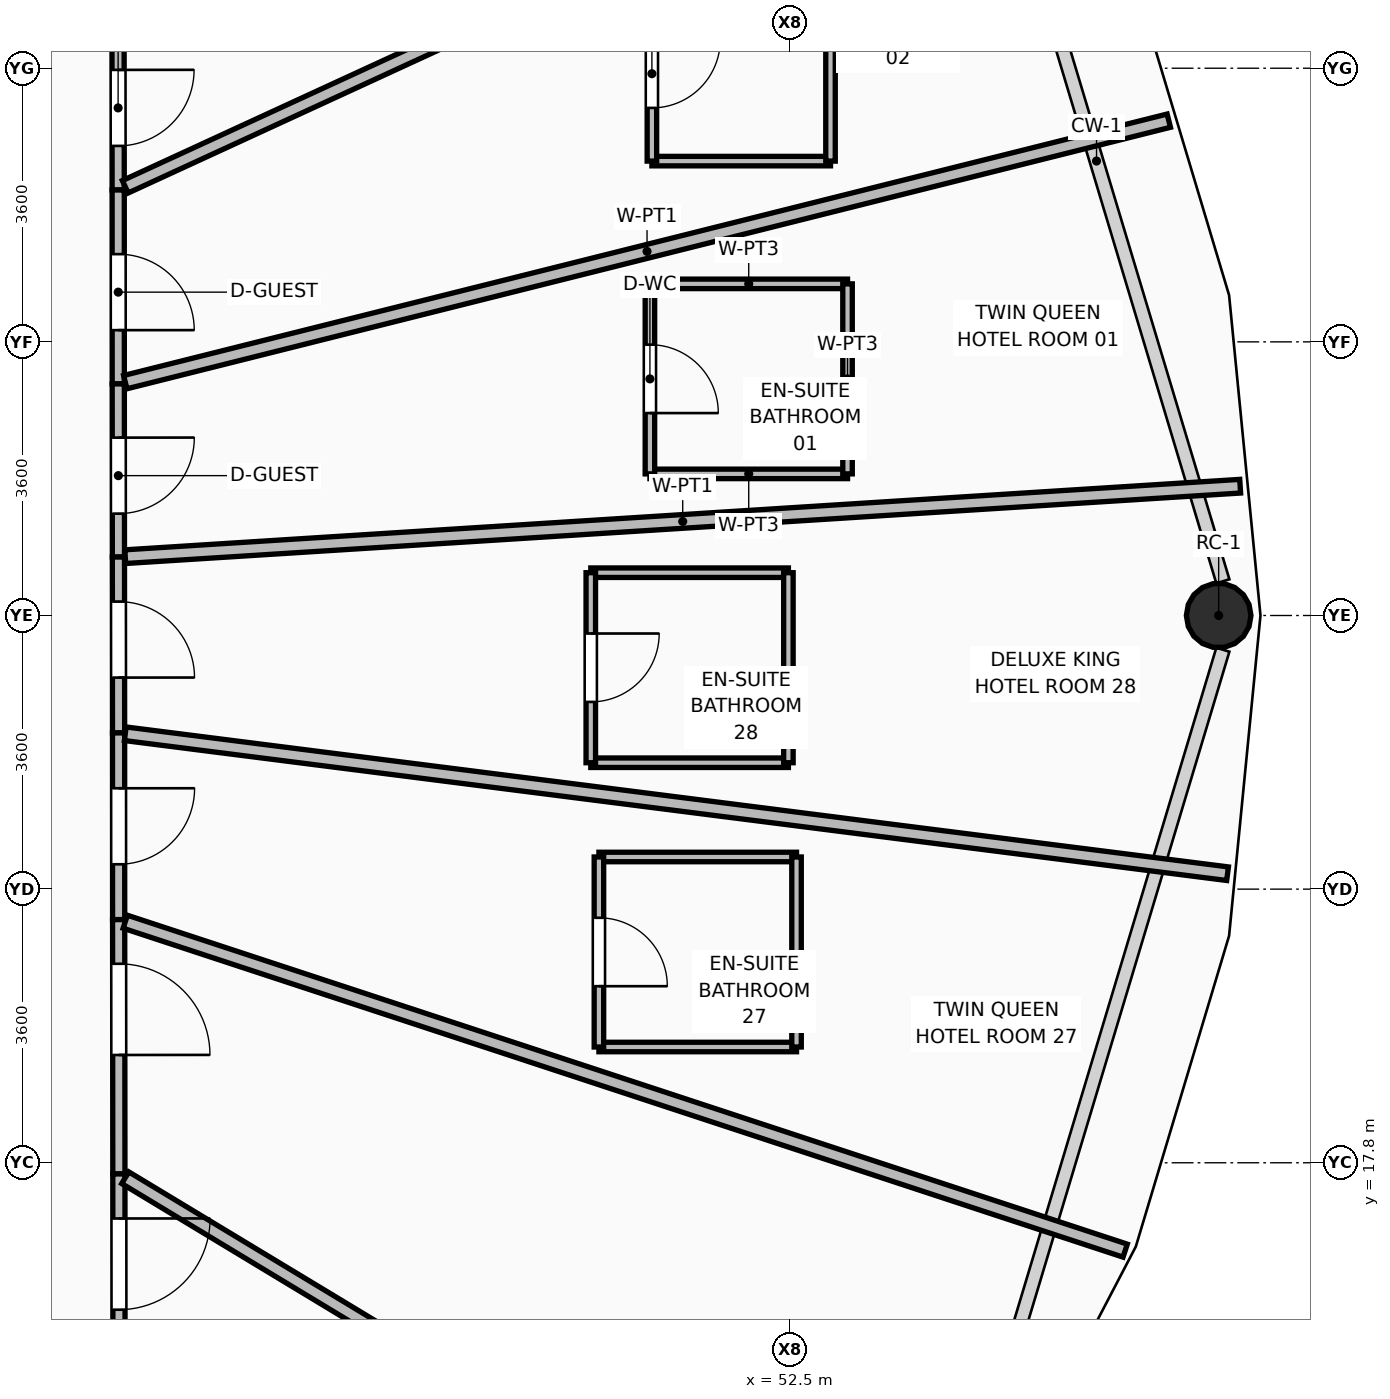
"""IFC4 building model, lengths in metres.
Left out: names, types, materials, properties, quantities, classifications, styles, units other than length and angle.
Written with IfcOpenShell. Run it as: python <this file> out.ifc"""

import sys

from ifc_helpers import new_model, si_unit, direction, frame, frame_2d, origin, origin_2d, place, context, subcontext, project, spatial, rectangle, hollow_circle, extrude, element, fill, save


model = new_model("IFC4")
c1 = context("Model", 3, precision=1e-05, world=origin(), true_north=direction((0.0, 1.0)))
c2 = subcontext(c1, "Body", "Model", "MODEL_VIEW")
j1 = project(units=[si_unit("LENGTHUNIT", "METRE"), si_unit("PLANEANGLEUNIT", "RADIAN")], contexts=[c1])
p1 = place(None, origin())
s1 = spatial("IfcSite", under=j1, at=p1, CompositionType="ELEMENT")
p2 = place(p1, origin())
s2 = spatial("IfcBuilding", under=s1, at=p2, CompositionType="ELEMENT")
p3 = place(p2, frame((0.0, 0.0, 53.25)))
s3 = spatial("IfcBuildingStorey", under=s2, at=p3, CompositionType="ELEMENT", Elevation=53.25)
p4 = place(p3, frame((58.139, 25.0, 0.0), z_axis=(0.221785382613, 0.0, 0.975095505096), x_axis=(0.0, 1.0, 0.0)))
e1 = element("IfcColumn", 1, at=p4, inside=s3, PredefinedType="COLUMN", context=c2, shape_type="SweptSolid", body=[
    extrude(hollow_circle(Radius=0.425, WallThickness=0.04, at=origin_2d()), origin(), (0.0, 0.0, 1.0), 3.661),
])
p5 = place(p3, frame((43.657, 33.737, 0.0), z_axis=(0.0, 0.0, 1.0), x_axis=(0.000933270709, -0.999999564503, 0.0)))
e2 = element("IfcWall", 2, at=p5, inside=s3, PredefinedType="PARTITIONING", context=c2, shape_type="SweptSolid", body=[
    extrude(rectangle(XDim=3.139, YDim=0.16, at=frame_2d((1.57, 0.0))), origin(), (0.0, 0.0, 1.0), 2.928),
])
p6 = place(p5, frame((1.559, 0.0, 0.0)))
e3 = element("IfcOpeningElement", 3, at=p6, cuts=e2, PredefinedType="OPENING", context=c2, shape_type="SweptSolid", body=[
    extrude(rectangle(XDim=1.0, YDim=2.1, at=frame_2d((0.5, 1.05))), frame((0.0, 0.09, 0.0), z_axis=(0.0, -1.0, 0.0), x_axis=(1.0, 0.0, 0.0)), (0.0, 0.0, 1.0), 0.18),
])
p7 = place(p3, frame((43.66, 30.598, 0.0), z_axis=(0.0, 0.0, 1.0), x_axis=(0.000382848364, -0.999999926714, 0.0)))
e4 = element("IfcWall", 4, at=p7, inside=s3, PredefinedType="PARTITIONING", context=c2, shape_type="SweptSolid", body=[
    extrude(rectangle(XDim=2.551, YDim=0.16, at=frame_2d((1.275, 0.0))), origin(), (0.0, 0.0, 1.0), 3.55),
])
p8 = place(p7, frame((0.844, 0.0, 0.0)))
e5 = element("IfcOpeningElement", 5, at=p8, cuts=e4, PredefinedType="OPENING", context=c2, shape_type="SweptSolid", body=[
    extrude(rectangle(XDim=1.0, YDim=2.1, at=frame_2d((0.5, 1.05))), frame((0.0, 0.09, 0.0), z_axis=(0.0, -1.0, 0.0), x_axis=(1.0, 0.0, 0.0)), (0.0, 0.0, 1.0), 0.18),
])
p9 = place(p3, frame((43.661, 28.047, 0.0), z_axis=(0.0, 0.0, 1.0), x_axis=(0.000964526397, -0.999999534844, 0.0)))
e6 = element("IfcWall", 6, at=p9, inside=s3, PredefinedType="PARTITIONING", context=c2, shape_type="SweptSolid", body=[
    extrude(rectangle(XDim=2.278, YDim=0.16, at=frame_2d((1.139, 0.0))), origin(), (0.0, 0.0, 1.0), 3.55),
])
p10 = place(p9, frame((0.707, 0.0, 0.0)))
e7 = element("IfcOpeningElement", 7, at=p10, cuts=e6, PredefinedType="OPENING", context=c2, shape_type="SweptSolid", body=[
    extrude(rectangle(XDim=1.0, YDim=2.1, at=frame_2d((0.5, 1.05))), frame((0.0, 0.09, 0.0), z_axis=(0.0, -1.0, 0.0), x_axis=(1.0, 0.0, 0.0)), (0.0, 0.0, 1.0), 0.18),
])
p11 = place(p3, frame((43.663, 25.769, 0.0), z_axis=(0.0, 0.0, 1.0), x_axis=(0.000844059628, -0.999999643782, 0.0)))
e8 = element("IfcWall", 8, at=p11, inside=s3, PredefinedType="PARTITIONING", context=c2, shape_type="SweptSolid", body=[
    extrude(rectangle(XDim=2.314, YDim=0.16, at=frame_2d((1.157, 0.0))), origin(), (0.0, 0.0, 1.0), 3.55),
])
p12 = place(p11, frame((0.586, 0.0, 0.0)))
e9 = element("IfcOpeningElement", 9, at=p12, cuts=e8, PredefinedType="OPENING", context=c2, shape_type="SweptSolid", body=[
    extrude(rectangle(XDim=1.0, YDim=2.1, at=frame_2d((0.5, 1.05))), frame((0.0, 0.09, 0.0), z_axis=(0.0, -1.0, 0.0), x_axis=(1.0, 0.0, 0.0)), (0.0, 0.0, 1.0), 0.18),
])
p13 = place(p3, frame((43.665, 23.455, 0.0), z_axis=(0.0, 0.0, 1.0), x_axis=(0.000397614283, -0.999999920951, 0.0)))
e10 = element("IfcWall", 10, at=p13, inside=s3, PredefinedType="PARTITIONING", context=c2, shape_type="SweptSolid", body=[
    extrude(rectangle(XDim=2.456, YDim=0.16, at=frame_2d((1.228, 0.0))), origin(), (0.0, 0.0, 1.0), 2.928),
])
p14 = place(p13, frame((0.728, 0.0, 0.0)))
e11 = element("IfcOpeningElement", 11, at=p14, cuts=e10, PredefinedType="OPENING", context=c2, shape_type="SweptSolid", body=[
    extrude(rectangle(XDim=1.0, YDim=2.1, at=frame_2d((0.5, 1.05))), frame((0.0, 0.09, 0.0), z_axis=(0.0, -1.0, 0.0), x_axis=(1.0, 0.0, 0.0)), (0.0, 0.0, 1.0), 0.18),
])
p15 = place(p3, frame((43.666, 20.999, 0.0), z_axis=(0.0, 0.0, 1.0), x_axis=(0.000875592514, -0.999999616669, 0.0)))
e12 = element("IfcWall", 12, at=p15, inside=s3, PredefinedType="PARTITIONING", context=c2, shape_type="SweptSolid", body=[
    extrude(rectangle(XDim=3.346, YDim=0.16, at=frame_2d((1.673, 0.0))), origin(), (0.0, 0.0, 1.0), 2.928),
])
p16 = place(p15, frame((0.581, 0.0, 0.0)))
e13 = element("IfcOpeningElement", 13, at=p16, cuts=e12, PredefinedType="OPENING", context=c2, shape_type="SweptSolid", body=[
    extrude(rectangle(XDim=1.2, YDim=2.1, at=frame_2d((0.6, 1.05))), frame((0.0, 0.09, 0.0), z_axis=(0.0, -1.0, 0.0), x_axis=(1.0, 0.0, 0.0)), (0.0, 0.0, 1.0), 0.18),
])
p17 = place(p3, frame((43.669, 17.653, 0.0), z_axis=(0.0, 0.0, 1.0), x_axis=(0.000535081189, -0.999999856844, 0.0)))
e14 = element("IfcWall", 14, at=p17, inside=s3, PredefinedType="PARTITIONING", context=c2, shape_type="SweptSolid", body=[
    extrude(rectangle(XDim=3.65, YDim=0.16, at=frame_2d((1.825, 0.0))), origin(), (0.0, 0.0, 1.0), 2.928),
])
p18 = place(p17, frame((0.586, 0.0, 0.0)))
e15 = element("IfcOpeningElement", 15, at=p18, cuts=e14, PredefinedType="OPENING", context=c2, shape_type="SweptSolid", body=[
    extrude(rectangle(XDim=1.2, YDim=2.1, at=frame_2d((0.6, 1.05))), frame((0.0, 0.09, 0.0), z_axis=(0.0, -1.0, 0.0), x_axis=(1.0, 0.0, 0.0)), (0.0, 0.0, 1.0), 0.18),
])
p19 = place(p3, frame((43.753, 25.774, 0.0), z_axis=(0.0, 0.0, 1.0), x_axis=(0.998009231822, 0.063068004547, 0.0)))
e16 = element("IfcWall", 16, at=p19, inside=s3, PredefinedType="PARTITIONING", context=c2, shape_type="SweptSolid", body=[
    extrude(rectangle(XDim=14.698, YDim=0.18, at=frame_2d((7.349, 0.0))), origin(), (0.0, 0.0, 1.0), 2.775),
])
p20 = place(p3, frame((43.753, 28.07, 0.0), z_axis=(0.0, 0.0, 1.0), x_axis=(0.970018590768, 0.243030725558, 0.0)))
e17 = element("IfcWall", 17, at=p20, inside=s3, PredefinedType="PARTITIONING", context=c2, shape_type="SweptSolid", body=[
    extrude(rectangle(XDim=14.154, YDim=0.18, at=frame_2d((7.077, 0.0))), origin(), (0.0, 0.0, 1.0), 2.775),
])
p21 = place(p3, frame((43.753, 30.64, 0.0), z_axis=(0.0, 0.0, 1.0), x_axis=(0.908354532473, 0.418200960466, 0.0)))
e18 = element("IfcWall", 18, at=p21, inside=s3, PredefinedType="PARTITIONING", context=c2, shape_type="SweptSolid", body=[
    extrude(rectangle(XDim=12.934, YDim=0.18, at=frame_2d((6.467, 0.0))), origin(), (0.0, 0.0, 1.0), 2.775),
])
p22 = place(p3, frame((43.753, 17.603, 0.0), z_axis=(0.0, 0.0, 1.0), x_axis=(0.856050971563, -0.516891414212, 0.0)))
e19 = element("IfcWall", 19, at=p22, inside=s3, PredefinedType="PARTITIONING", context=c2, shape_type="SweptSolid", body=[
    extrude(rectangle(XDim=11.8, YDim=0.18, at=frame_2d((5.9, 0.0))), origin(), (0.0, 0.0, 1.0), 2.775),
])
p23 = place(p3, frame((43.753, 20.971, 0.0), z_axis=(0.0, 0.0, 1.0), x_axis=(0.949941417746, -0.312428076284, 0.0)))
e20 = element("IfcWall", 20, at=p23, inside=s3, PredefinedType="PARTITIONING", context=c2, shape_type="SweptSolid", body=[
    extrude(rectangle(XDim=13.849, YDim=0.18, at=frame_2d((6.925, 0.0))), origin(), (0.0, 0.0, 1.0), 2.775),
])
p24 = place(p3, frame((43.753, 23.444, 0.0), z_axis=(0.0, 0.0, 1.0), x_axis=(0.992038929139, -0.125931580921, 0.0)))
e21 = element("IfcWall", 21, at=p24, inside=s3, PredefinedType="PARTITIONING", context=c2, shape_type="SweptSolid", body=[
    extrude(rectangle(XDim=14.62, YDim=0.18, at=frame_2d((7.31, 0.0))), origin(), (0.0, 0.0, 1.0), 2.775),
])
for number, where, z_axis, x_axis in (
    (22, (50.656, 26.863, 0.0), (0.0, 0.0, 1.0), (1.0, 0.0, 0.0)),
    (23, (50.656, 29.363, 0.0), (0.0, 0.0, 1.0), (1.0, 0.0, 0.0)),
):
    element("IfcWall", number, at=place(p3, frame(where, z_axis=z_axis, x_axis=x_axis)), inside=s3, PredefinedType="PARTITIONING", context=c2, shape_type="SweptSolid", body=[
        extrude(rectangle(XDim=2.6, YDim=0.125, at=frame_2d((1.3, 0.0))), origin(), (0.0, 0.0, 1.0), 3.55),
    ])
p25 = place(p3, frame((50.656, 26.863, 0.0), z_axis=(0.0, 0.0, 1.0), x_axis=(0.0, 1.0, 0.0)))
e24 = element("IfcWall", 24, at=p25, inside=s3, PredefinedType="PARTITIONING", context=c2, shape_type="SweptSolid", body=[
    extrude(rectangle(XDim=2.5, YDim=0.125, at=frame_2d((1.25, 0.0))), origin(), (0.0, 0.0, 1.0), 3.55),
])
p26 = place(p25, frame((0.8, 0.0, 0.0)))
e25 = element("IfcOpeningElement", 25, at=p26, cuts=e24, PredefinedType="OPENING", context=c2, shape_type="SweptSolid", body=[
    extrude(rectangle(XDim=0.9, YDim=2.1, at=frame_2d((0.45, 1.05))), frame((0.0, 0.073, 0.0), z_axis=(0.0, -1.0, 0.0), x_axis=(1.0, 0.0, 0.0)), (0.0, 0.0, 1.0), 0.145),
])
p27 = place(p3, frame((53.256, 26.863, 0.0), z_axis=(0.0, 0.0, 1.0), x_axis=(0.0, 1.0, 0.0)))
e26 = element("IfcWall", 26, at=p27, inside=s3, PredefinedType="PARTITIONING", context=c2, shape_type="SweptSolid", body=[
    extrude(rectangle(XDim=2.5, YDim=0.125, at=frame_2d((1.25, 0.0))), origin(), (0.0, 0.0, 1.0), 3.55),
])
p28 = place(p3, frame((50.682, 30.978, 0.0), z_axis=(0.0, 0.0, 1.0), x_axis=(1.0, 0.0, 0.0)))
e27 = element("IfcWall", 27, at=p28, inside=s3, PredefinedType="PARTITIONING", context=c2, shape_type="SweptSolid", body=[
    extrude(rectangle(XDim=2.35, YDim=0.125, at=frame_2d((1.175, 0.0))), origin(), (0.0, 0.0, 1.0), 3.55),
])
p29 = place(p3, frame((50.682, 30.978, 0.0), z_axis=(0.0, 0.0, 1.0), x_axis=(0.0, 1.0, 0.0)))
e28 = element("IfcWall", 28, at=p29, inside=s3, PredefinedType="PARTITIONING", context=c2, shape_type="SweptSolid", body=[
    extrude(rectangle(XDim=2.3, YDim=0.125, at=frame_2d((1.15, 0.0))), origin(), (0.0, 0.0, 1.0), 3.55),
])
p30 = place(p29, frame((0.7, 0.0, 0.0)))
e29 = element("IfcOpeningElement", 29, at=p30, cuts=e28, PredefinedType="OPENING", context=c2, shape_type="SweptSolid", body=[
    extrude(rectangle(XDim=0.9, YDim=2.1, at=frame_2d((0.45, 1.05))), frame((0.0, 0.073, 0.0), z_axis=(0.0, -1.0, 0.0), x_axis=(1.0, 0.0, 0.0)), (0.0, 0.0, 1.0), 0.145),
])
p31 = place(p3, frame((53.032, 30.978, 0.0), z_axis=(0.0, 0.0, 1.0), x_axis=(0.0, 1.0, 0.0)))
e30 = element("IfcWall", 30, at=p31, inside=s3, PredefinedType="PARTITIONING", context=c2, shape_type="SweptSolid", body=[
    extrude(rectangle(XDim=2.3, YDim=0.125, at=frame_2d((1.15, 0.0))), origin(), (0.0, 0.0, 1.0), 3.55),
])
for number, where, z_axis, x_axis in (
    (31, (49.985, 19.323, 0.0), (0.0, 0.0, 1.0), (1.0, 0.0, 0.0)),
    (32, (49.985, 21.823, 0.0), (0.0, 0.0, 1.0), (1.0, 0.0, 0.0)),
):
    element("IfcWall", number, at=place(p3, frame(where, z_axis=z_axis, x_axis=x_axis)), inside=s3, PredefinedType="PARTITIONING", context=c2, shape_type="SweptSolid", body=[
        extrude(rectangle(XDim=2.6, YDim=0.125, at=frame_2d((1.3, 0.0))), origin(), (0.0, 0.0, 1.0), 3.55),
    ])
p32 = place(p3, frame((49.985, 19.323, 0.0), z_axis=(0.0, 0.0, 1.0), x_axis=(0.0, 1.0, 0.0)))
e33 = element("IfcWall", 33, at=p32, inside=s3, PredefinedType="PARTITIONING", context=c2, shape_type="SweptSolid", body=[
    extrude(rectangle(XDim=2.5, YDim=0.125, at=frame_2d((1.25, 0.0))), origin(), (0.0, 0.0, 1.0), 3.55),
])
p33 = place(p32, frame((0.8, 0.0, 0.0)))
e34 = element("IfcOpeningElement", 34, at=p33, cuts=e33, PredefinedType="OPENING", context=c2, shape_type="SweptSolid", body=[
    extrude(rectangle(XDim=0.9, YDim=2.1, at=frame_2d((0.45, 1.05))), frame((0.0, 0.073, 0.0), z_axis=(0.0, -1.0, 0.0), x_axis=(1.0, 0.0, 0.0)), (0.0, 0.0, 1.0), 0.145),
])
p34 = place(p3, frame((52.585, 19.323, 0.0), z_axis=(0.0, 0.0, 1.0), x_axis=(0.0, 1.0, 0.0)))
e35 = element("IfcWall", 35, at=p34, inside=s3, PredefinedType="PARTITIONING", context=c2, shape_type="SweptSolid", body=[
    extrude(rectangle(XDim=2.5, YDim=0.125, at=frame_2d((1.25, 0.0))), origin(), (0.0, 0.0, 1.0), 3.55),
])
p35 = place(p3, frame((49.878, 23.063, 0.0), z_axis=(0.0, 0.0, 1.0), x_axis=(1.0, 0.0, 0.0)))
e36 = element("IfcWall", 36, at=p35, inside=s3, PredefinedType="PARTITIONING", context=c2, shape_type="SweptSolid", body=[
    extrude(rectangle(XDim=2.6, YDim=0.125, at=frame_2d((1.3, 0.0))), origin(), (0.0, 0.0, 1.0), 2.928),
])
p36 = place(p3, frame((49.878, 25.563, 0.0), z_axis=(0.0, 0.0, 1.0), x_axis=(1.0, 0.0, 0.0)))
e37 = element("IfcWall", 37, at=p36, inside=s3, PredefinedType="PARTITIONING", context=c2, shape_type="SweptSolid", body=[
    extrude(rectangle(XDim=2.6, YDim=0.125, at=frame_2d((1.3, 0.0))), origin(), (0.0, 0.0, 1.0), 3.55),
])
p37 = place(p3, frame((49.878, 23.063, 0.0), z_axis=(0.0, 0.0, 1.0), x_axis=(0.0, 1.0, 0.0)))
e38 = element("IfcWall", 38, at=p37, inside=s3, PredefinedType="PARTITIONING", context=c2, shape_type="SweptSolid", body=[
    extrude(rectangle(XDim=2.5, YDim=0.125, at=frame_2d((1.25, 0.0))), origin(), (0.0, 0.0, 1.0), 3.55),
])
p38 = place(p37, frame((0.8, 0.0, 0.0)))
e39 = element("IfcOpeningElement", 39, at=p38, cuts=e38, PredefinedType="OPENING", context=c2, shape_type="SweptSolid", body=[
    extrude(rectangle(XDim=0.9, YDim=2.1, at=frame_2d((0.45, 1.05))), frame((0.0, 0.073, 0.0), z_axis=(0.0, -1.0, 0.0), x_axis=(1.0, 0.0, 0.0)), (0.0, 0.0, 1.0), 0.145),
])
p39 = place(p3, frame((52.478, 23.063, 0.0), z_axis=(0.0, 0.0, 1.0), x_axis=(0.0, 1.0, 0.0)))
e40 = element("IfcWall", 40, at=p39, inside=s3, PredefinedType="PARTITIONING", context=c2, shape_type="SweptSolid", body=[
    extrude(rectangle(XDim=2.5, YDim=0.125, at=frame_2d((1.25, 0.0))), origin(), (0.0, 0.0, 1.0), 2.928),
])
p40 = place(p26, frame((0.9, 0.0, 0.0), z_axis=(0.0, 0.0, 1.0), x_axis=(-1.0, 0.0, 0.0)))
e41 = element("IfcDoor", 41, at=p40, inside=s3, OperationType="SINGLE_SWING_RIGHT", PredefinedType="DOOR", context=c2, shape_type="SweptSolid", body=[
    extrude(rectangle(XDim=0.9, YDim=2.1, at=frame_2d((0.45, 1.05))), frame((0.0, 0.025, 0.0), z_axis=(0.0, -1.0, 0.0), x_axis=(1.0, 0.0, 0.0)), (0.0, 0.0, 1.0), 0.05),
])
fill(e25, e41)
p41 = place(p10, origin())
e42 = element("IfcDoor", 42, at=p41, inside=s3, OperationType="SINGLE_SWING_LEFT", PredefinedType="DOOR", context=c2, shape_type="SweptSolid", body=[
    extrude(rectangle(XDim=1.0, YDim=2.1, at=frame_2d((0.5, 1.05))), frame((0.0, 0.025, 0.0), z_axis=(0.0, -1.0, 0.0), x_axis=(1.0, 0.0, 0.0)), (0.0, 0.0, 1.0), 0.05),
])
fill(e7, e42)
p42 = place(p30, frame((0.9, 0.0, 0.0), z_axis=(0.0, 0.0, 1.0), x_axis=(-1.0, 0.0, 0.0)))
e43 = element("IfcDoor", 43, at=p42, inside=s3, OperationType="SINGLE_SWING_LEFT", PredefinedType="DOOR", context=c2, shape_type="SweptSolid", body=[
    extrude(rectangle(XDim=0.9, YDim=2.1, at=frame_2d((0.45, 1.05))), frame((0.0, 0.025, 0.0), z_axis=(0.0, -1.0, 0.0), x_axis=(1.0, 0.0, 0.0)), (0.0, 0.0, 1.0), 0.05),
])
fill(e29, e43)
p43 = place(p8, origin())
e44 = element("IfcDoor", 44, at=p43, inside=s3, OperationType="SINGLE_SWING_RIGHT", PredefinedType="DOOR", context=c2, shape_type="SweptSolid", body=[
    extrude(rectangle(XDim=1.0, YDim=2.1, at=frame_2d((0.5, 1.05))), frame((0.0, 0.025, 0.0), z_axis=(0.0, -1.0, 0.0), x_axis=(1.0, 0.0, 0.0)), (0.0, 0.0, 1.0), 0.05),
])
fill(e5, e44)
p44 = place(p6, origin())
e45 = element("IfcDoor", 45, at=p44, inside=s3, OperationType="SINGLE_SWING_LEFT", PredefinedType="DOOR", context=c2, shape_type="SweptSolid", body=[
    extrude(rectangle(XDim=1.0, YDim=2.1, at=frame_2d((0.5, 1.05))), frame((0.0, 0.025, 0.0), z_axis=(0.0, -1.0, 0.0), x_axis=(1.0, 0.0, 0.0)), (0.0, 0.0, 1.0), 0.05),
])
fill(e3, e45)
p45 = place(p18, origin())
e46 = element("IfcDoor", 46, at=p45, inside=s3, OperationType="SINGLE_SWING_LEFT", PredefinedType="DOOR", context=c2, shape_type="SweptSolid", body=[
    extrude(rectangle(XDim=1.2, YDim=2.1, at=frame_2d((0.6, 1.05))), frame((0.0, 0.025, 0.0), z_axis=(0.0, -1.0, 0.0), x_axis=(1.0, 0.0, 0.0)), (0.0, 0.0, 1.0), 0.05),
])
fill(e15, e46)
p46 = place(p16, origin())
e47 = element("IfcDoor", 47, at=p46, inside=s3, OperationType="SINGLE_SWING_RIGHT", PredefinedType="DOOR", context=c2, shape_type="SweptSolid", body=[
    extrude(rectangle(XDim=1.2, YDim=2.1, at=frame_2d((0.6, 1.05))), frame((0.0, 0.025, 0.0), z_axis=(0.0, -1.0, 0.0), x_axis=(1.0, 0.0, 0.0)), (0.0, 0.0, 1.0), 0.05),
])
fill(e13, e47)
p47 = place(p33, frame((0.9, 0.0, 0.0), z_axis=(0.0, 0.0, 1.0), x_axis=(-1.0, 0.0, 0.0)))
e48 = element("IfcDoor", 48, at=p47, inside=s3, OperationType="SINGLE_SWING_RIGHT", PredefinedType="DOOR", context=c2, shape_type="SweptSolid", body=[
    extrude(rectangle(XDim=0.9, YDim=2.1, at=frame_2d((0.45, 1.05))), frame((0.0, 0.025, 0.0), z_axis=(0.0, -1.0, 0.0), x_axis=(1.0, 0.0, 0.0)), (0.0, 0.0, 1.0), 0.05),
])
fill(e34, e48)
p48 = place(p14, origin())
e49 = element("IfcDoor", 49, at=p48, inside=s3, OperationType="SINGLE_SWING_LEFT", PredefinedType="DOOR", context=c2, shape_type="SweptSolid", body=[
    extrude(rectangle(XDim=1.0, YDim=2.1, at=frame_2d((0.5, 1.05))), frame((0.0, 0.025, 0.0), z_axis=(0.0, -1.0, 0.0), x_axis=(1.0, 0.0, 0.0)), (0.0, 0.0, 1.0), 0.05),
])
fill(e11, e49)
p49 = place(p38, frame((0.9, 0.0, 0.0), z_axis=(0.0, 0.0, 1.0), x_axis=(-1.0, 0.0, 0.0)))
e50 = element("IfcDoor", 50, at=p49, inside=s3, OperationType="SINGLE_SWING_LEFT", PredefinedType="DOOR", context=c2, shape_type="SweptSolid", body=[
    extrude(rectangle(XDim=0.9, YDim=2.1, at=frame_2d((0.45, 1.05))), frame((0.0, 0.025, 0.0), z_axis=(0.0, -1.0, 0.0), x_axis=(1.0, 0.0, 0.0)), (0.0, 0.0, 1.0), 0.05),
])
fill(e39, e50)
p50 = place(p12, origin())
e51 = element("IfcDoor", 51, at=p50, inside=s3, OperationType="SINGLE_SWING_RIGHT", PredefinedType="DOOR", context=c2, shape_type="SweptSolid", body=[
    extrude(rectangle(XDim=1.0, YDim=2.1, at=frame_2d((0.5, 1.05))), frame((0.0, 0.025, 0.0), z_axis=(0.0, -1.0, 0.0), x_axis=(1.0, 0.0, 0.0)), (0.0, 0.0, 1.0), 0.05),
])
fill(e9, e51)
save(model, sys.argv[1])
